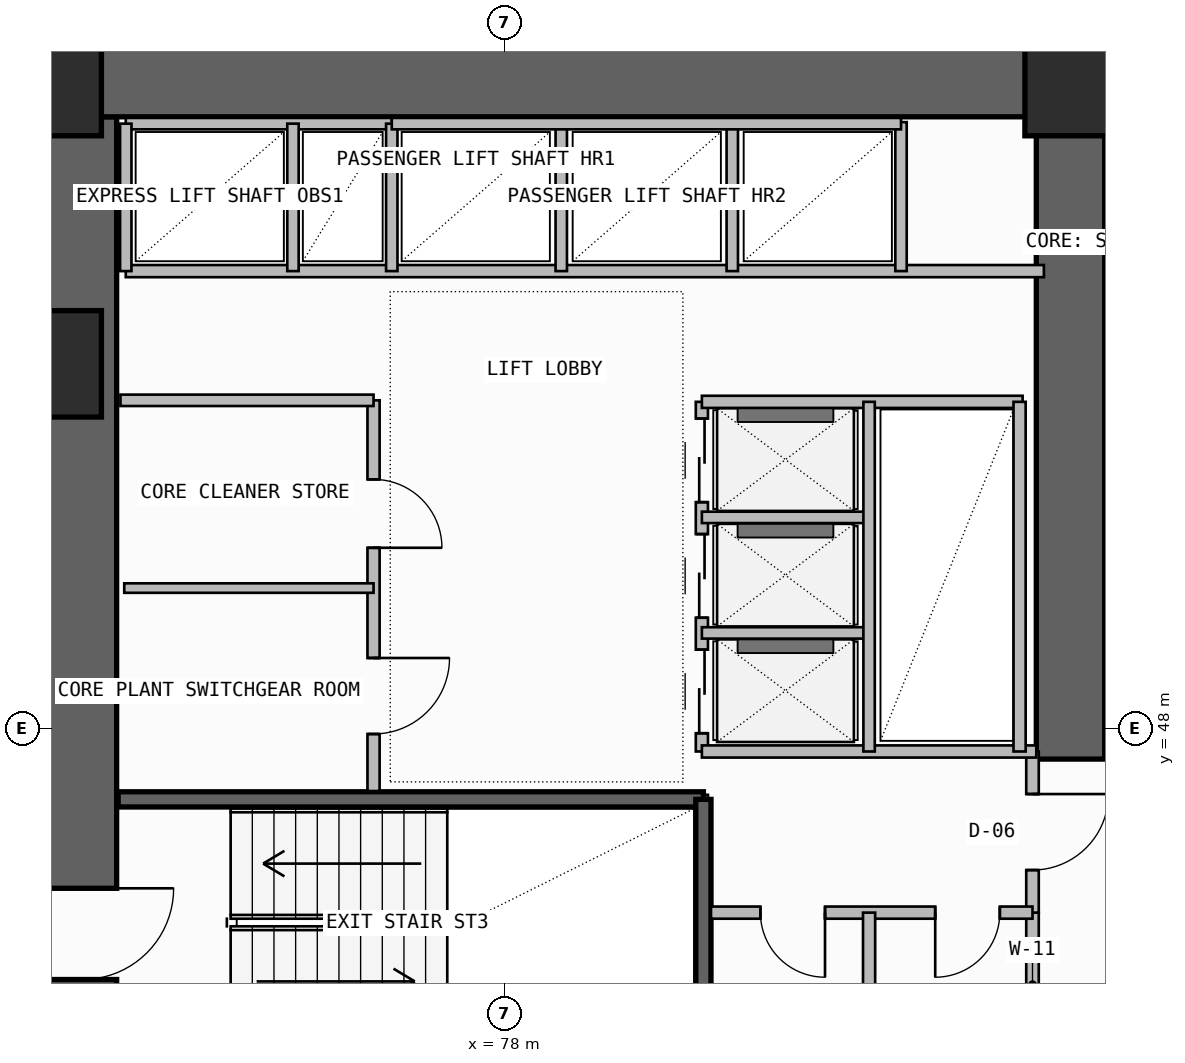
"""IFC4 building model, lengths in metres.
Left out: names, types, materials, properties, quantities, classifications, styles, units other than length and angle.
Written with IfcOpenShell. Run it as: python <this file> out.ifc"""

import sys

from ifc_helpers import new_model, si_unit, direction, frame, frame_2d, origin, origin_2d, place, context, subcontext, project, spatial, rectangle, extrude, element, fill, save


model = new_model("IFC4")
c1 = context("Model", 3, precision=1e-05, world=origin(), true_north=direction((0.0, 1.0)))
c2 = subcontext(c1, "Body", "Model", "MODEL_VIEW")
j1 = project(units=[si_unit("LENGTHUNIT", "METRE"), si_unit("PLANEANGLEUNIT", "RADIAN")], contexts=[c1])
p1 = place(None, origin())
s1 = spatial("IfcSite", under=j1, at=p1, CompositionType="ELEMENT")
p2 = place(p1, origin())
s2 = spatial("IfcBuilding", under=s1, at=p2, CompositionType="ELEMENT")
p3 = place(p2, frame((0.0, 0.0, 120.9)))
s3 = spatial("IfcBuildingStorey", under=s2, at=p3, CompositionType="ELEMENT", Elevation=120.9)
p4 = place(p3, frame((72.45, 43.35, -0.26), z_axis=(0.0, 0.0, 1.0), x_axis=(0.0, 1.0, 0.0)))
e1 = element("IfcWall", 1, at=p4, inside=s3, PredefinedType="SHEAR", context=c2, shape_type="SweptSolid", body=[
    extrude(rectangle(XDim=12.7, YDim=0.9, at=frame_2d((6.35, 0.0))), origin(), (0.0, 0.0, 1.0), 3.6),
])
p5 = place(p4, frame((1.35, 0.0, 0.26)))
e2 = element("IfcOpeningElement", 2, at=p5, cuts=e1, PredefinedType="OPENING", context=c2, shape_type="SweptSolid", body=[
    extrude(rectangle(XDim=1.2, YDim=2.2, at=frame_2d((0.6, 1.1))), frame((0.0, 0.46, 0.0), z_axis=(0.0, -1.0, 0.0), x_axis=(1.0, 0.0, 0.0)), (0.0, 0.0, 1.0), 0.92),
])
p6 = place(p3, frame((72.0, 56.5, -0.26), z_axis=(0.0, 0.0, 1.0), x_axis=(1.0, 0.0, 0.0)))
e3 = element("IfcWall", 3, at=p6, inside=s3, PredefinedType="SHEAR", context=c2, shape_type="SweptSolid", body=[
    extrude(rectangle(XDim=13.9, YDim=0.9, at=frame_2d((6.95, 0.0))), origin(), (0.0, 0.0, 1.0), 3.6),
])
p7 = place(p3, frame((85.45, 47.6, -0.26), z_axis=(0.0, 0.0, 1.0), x_axis=(0.0, 1.0, 0.0)))
e4 = element("IfcWall", 4, at=p7, inside=s3, PredefinedType="SHEAR", context=c2, shape_type="SweptSolid", body=[
    extrude(rectangle(XDim=8.45, YDim=0.9, at=frame_2d((4.225, 0.0))), origin(), (0.0, 0.0, 1.0), 3.6),
])
for number, where, z_axis, x_axis in (
    (5, (72.0, 52.8, 0.0), (0.0, 0.0, 1.0), (1.0, 0.0, 0.0)),
    (6, (72.0, 56.5, 0.0), (0.0, 0.0, 1.0), (1.0, 0.0, 0.0)),
    (7, (85.55, 56.5, 0.0), (0.0, 0.0, 1.0), (1.0, 0.0, 0.0)),
):
    element("IfcColumn", number, at=place(p3, frame(where, z_axis=z_axis, x_axis=x_axis)), inside=s3, PredefinedType="COLUMN", context=c2, shape_type="SweptSolid", body=[
        extrude(rectangle(XDim=1.4, YDim=1.4, at=origin_2d()), origin(), (0.0, 0.0, 1.0), 3.6),
    ])
p8 = place(p3, frame((72.92, 47.07, -0.26), z_axis=(0.0, 0.0, 1.0), x_axis=(1.0, 0.0, 0.0)))
e8 = element("IfcWall", 8, at=p8, inside=s3, PredefinedType="SOLIDWALL", context=c2, shape_type="SweptSolid", body=[
    extrude(rectangle(XDim=7.7, YDim=0.2, at=frame_2d((3.85, 0.0))), origin(), (0.0, 0.0, 1.0), 3.6),
])
p9 = place(p3, frame((80.62, 43.83, -0.26), z_axis=(0.0, 0.0, 1.0), x_axis=(0.0, 1.0, 0.0)))
e9 = element("IfcWall", 9, at=p9, inside=s3, PredefinedType="SOLIDWALL", context=c2, shape_type="SweptSolid", body=[
    extrude(rectangle(XDim=3.24, YDim=0.2, at=frame_2d((1.62, 0.0))), origin(), (0.0, 0.0, 1.0), 3.6),
])
p10 = place(p3, frame((84.95, 43.68, 0.0), z_axis=(0.0, 0.0, 1.0), x_axis=(0.0, 1.0, 0.0)))
e10 = element("IfcWall", 10, at=p10, inside=s3, PredefinedType="PLUMBINGWALL", context=c2, shape_type="SweptSolid", body=[
    extrude(rectangle(XDim=1.9, YDim=0.165, at=frame_2d((0.95, 0.0))), origin(), (0.0, 0.0, 1.0), 3.34),
])
p11 = place(p3, frame((84.95, 45.58, 0.0), z_axis=(0.0, 0.0, 1.0), x_axis=(0.0, 1.0, 0.0)))
e11 = element("IfcWall", 11, at=p11, inside=s3, PredefinedType="PARTITIONING", context=c2, shape_type="SweptSolid", body=[
    extrude(rectangle(XDim=2.12, YDim=0.165, at=frame_2d((1.06, 0.0))), origin(), (0.0, 0.0, 1.0), 3.34),
])
p12 = place(p11, frame((0.56, 0.0, 0.0)))
e12 = element("IfcOpeningElement", 12, at=p12, cuts=e11, PredefinedType="OPENING", context=c2, shape_type="SweptSolid", body=[
    extrude(rectangle(XDim=1.0, YDim=2.2, at=frame_2d((0.5, 1.1))), frame((0.0, 0.093, 0.0), z_axis=(0.0, -1.0, 0.0), x_axis=(1.0, 0.0, 0.0)), (0.0, 0.0, 1.0), 0.185),
])
p13 = place(p3, frame((80.72, 45.58, 0.0), z_axis=(0.0, 0.0, 1.0), x_axis=(1.0, 0.0, 0.0)))
e13 = element("IfcWall", 13, at=p13, inside=s3, PredefinedType="PLUMBINGWALL", context=c2, shape_type="SweptSolid", body=[
    extrude(rectangle(XDim=4.23, YDim=0.16, at=frame_2d((2.115, 0.0))), origin(), (0.0, 0.0, 1.0), 3.34),
])
p14 = place(p13, frame((0.65, 0.0, 0.0)))
e14 = element("IfcOpeningElement", 14, at=p14, cuts=e13, PredefinedType="OPENING", context=c2, shape_type="SweptSolid", body=[
    extrude(rectangle(XDim=0.85, YDim=2.05, at=frame_2d((0.425, 1.025))), frame((0.0, 0.09, 0.0), z_axis=(0.0, -1.0, 0.0), x_axis=(1.0, 0.0, 0.0)), (0.0, 0.0, 1.0), 0.18),
])
p15 = place(p13, frame((2.95, 0.0, 0.0)))
e15 = element("IfcOpeningElement", 15, at=p15, cuts=e13, PredefinedType="OPENING", context=c2, shape_type="SweptSolid", body=[
    extrude(rectangle(XDim=0.85, YDim=2.05, at=frame_2d((0.425, 1.025))), frame((0.0, 0.09, 0.0), z_axis=(0.0, -1.0, 0.0), x_axis=(1.0, 0.0, 0.0)), (0.0, 0.0, 1.0), 0.18),
])
p16 = place(p3, frame((82.8, 43.68, 0.0), z_axis=(0.0, 0.0, 1.0), x_axis=(0.0, 1.0, 0.0)))
e16 = element("IfcWall", 16, at=p16, inside=s3, PredefinedType="PLUMBINGWALL", context=c2, shape_type="SweptSolid", body=[
    extrude(rectangle(XDim=1.9, YDim=0.16, at=frame_2d((0.95, 0.0))), origin(), (0.0, 0.0, 1.0), 3.34),
])
p17 = place(p3, frame((76.28, 47.18, 0.0), z_axis=(0.0, 0.0, 1.0), x_axis=(0.0, 1.0, 0.0)))
e17 = element("IfcWall", 17, at=p17, inside=s3, PredefinedType="SOLIDWALL", context=c2, shape_type="SweptSolid", body=[
    extrude(rectangle(XDim=5.14, YDim=0.16, at=frame_2d((2.57, 0.0))), origin(), (0.0, 0.0, 1.0), 3.34),
])
p18 = place(p17, frame((0.75, 0.0, 0.0)))
e18 = element("IfcOpeningElement", 18, at=p18, cuts=e17, PredefinedType="OPENING", context=c2, shape_type="SweptSolid", body=[
    extrude(rectangle(XDim=1.0, YDim=2.2, at=frame_2d((0.5, 1.1))), frame((0.0, 0.09, 0.0), z_axis=(0.0, -1.0, 0.0), x_axis=(1.0, 0.0, 0.0)), (0.0, 0.0, 1.0), 0.18),
])
p19 = place(p17, frame((3.2, 0.0, 0.0)))
e19 = element("IfcOpeningElement", 19, at=p19, cuts=e17, PredefinedType="OPENING", context=c2, shape_type="SweptSolid", body=[
    extrude(rectangle(XDim=0.9, YDim=2.1, at=frame_2d((0.45, 1.05))), frame((0.0, 0.09, 0.0), z_axis=(0.0, -1.0, 0.0), x_axis=(1.0, 0.0, 0.0)), (0.0, 0.0, 1.0), 0.18),
])
p20 = place(p3, frame((72.95, 52.32, 0.0), z_axis=(0.0, 0.0, 1.0), x_axis=(1.0, 0.0, 0.0)))
e20 = element("IfcWall", 20, at=p20, inside=s3, PredefinedType="SOLIDWALL", context=c2, shape_type="SweptSolid", body=[
    extrude(rectangle(XDim=3.33, YDim=0.15, at=frame_2d((1.665, 0.0))), origin(), (0.0, 0.0, 1.0), 3.34),
])
p21 = place(p3, frame((73.0, 49.85, 0.0), z_axis=(0.0, 0.0, 1.0), x_axis=(1.0, 0.0, 0.0)))
e21 = element("IfcWall", 21, at=p21, inside=s3, PredefinedType="PARTITIONING", context=c2, shape_type="SweptSolid", body=[
    extrude(rectangle(XDim=3.28, YDim=0.125, at=frame_2d((1.64, 0.0))), origin(), (0.0, 0.0, 1.0), 3.34),
])
p22 = place(p3, frame((80.6, 47.7, 0.0), z_axis=(0.0, 0.0, 1.0), x_axis=(0.0, 1.0, 0.0)))
e22 = element("IfcWall", 22, at=p22, inside=s3, PredefinedType="SOLIDWALL", context=c2, shape_type="SweptSolid", body=[
    extrude(rectangle(XDim=4.6, YDim=0.16, at=frame_2d((2.3, 0.0))), origin(), (0.0, 0.0, 1.0), 3.34),
])
p23 = place(p22, frame((0.24, 0.0, 0.0)))
e23 = element("IfcOpeningElement", 23, at=p23, cuts=e22, PredefinedType="OPENING", context=c2, shape_type="SweptSolid", body=[
    extrude(rectangle(XDim=1.1, YDim=2.25, at=frame_2d((0.55, 1.125))), frame((0.0, 0.09, 0.0), z_axis=(0.0, -1.0, 0.0), x_axis=(1.0, 0.0, 0.0)), (0.0, 0.0, 1.0), 0.18),
])
p24 = place(p22, frame((1.76, 0.0, 0.0)))
e24 = element("IfcOpeningElement", 24, at=p24, cuts=e22, PredefinedType="OPENING", context=c2, shape_type="SweptSolid", body=[
    extrude(rectangle(XDim=1.1, YDim=2.25, at=frame_2d((0.55, 1.125))), frame((0.0, 0.09, 0.0), z_axis=(0.0, -1.0, 0.0), x_axis=(1.0, 0.0, 0.0)), (0.0, 0.0, 1.0), 0.18),
])
p25 = place(p22, frame((3.28, 0.0, 0.0)))
e25 = element("IfcOpeningElement", 25, at=p25, cuts=e22, PredefinedType="OPENING", context=c2, shape_type="SweptSolid", body=[
    extrude(rectangle(XDim=1.1, YDim=2.25, at=frame_2d((0.55, 1.125))), frame((0.0, 0.09, 0.0), z_axis=(0.0, -1.0, 0.0), x_axis=(1.0, 0.0, 0.0)), (0.0, 0.0, 1.0), 0.18),
])
p26 = place(p3, frame((80.6, 47.7, 0.0), z_axis=(0.0, 0.0, 1.0), x_axis=(1.0, 0.0, 0.0)))
e26 = element("IfcWall", 26, at=p26, inside=s3, PredefinedType="SOLIDWALL", context=c2, shape_type="SweptSolid", body=[
    extrude(rectangle(XDim=4.4, YDim=0.16, at=frame_2d((2.2, 0.0))), origin(), (0.0, 0.0, 1.0), 3.34),
])
p27 = place(p3, frame((80.6, 52.3, 0.0), z_axis=(0.0, 0.0, 1.0), x_axis=(1.0, 0.0, 0.0)))
e27 = element("IfcWall", 27, at=p27, inside=s3, PredefinedType="SOLIDWALL", context=c2, shape_type="SweptSolid", body=[
    extrude(rectangle(XDim=4.22, YDim=0.16, at=frame_2d((2.11, 0.0))), origin(), (0.0, 0.0, 1.0), 3.34),
])
for number, where, z_axis, x_axis in (
    (28, (80.6, 49.26, 0.0), (0.0, 0.0, 1.0), (1.0, 0.0, 0.0)),
    (29, (80.6, 50.78, 0.0), (0.0, 0.0, 1.0), (1.0, 0.0, 0.0)),
):
    element("IfcWall", number, at=place(p3, frame(where, z_axis=z_axis, x_axis=x_axis)), inside=s3, PredefinedType="PLUMBINGWALL", context=c2, shape_type="SweptSolid", body=[
        extrude(rectangle(XDim=2.2, YDim=0.15, at=frame_2d((1.1, 0.0))), origin(), (0.0, 0.0, 1.0), 3.34),
    ])
p28 = place(p3, frame((82.8, 47.7, 0.0), z_axis=(0.0, 0.0, 1.0), x_axis=(0.0, 1.0, 0.0)))
e30 = element("IfcWall", 30, at=p28, inside=s3, PredefinedType="PLUMBINGWALL", context=c2, shape_type="SweptSolid", body=[
    extrude(rectangle(XDim=4.6, YDim=0.15, at=frame_2d((2.3, 0.0))), origin(), (0.0, 0.0, 1.0), 3.34),
])
p29 = place(p3, frame((84.78, 47.7, 0.0), z_axis=(0.0, 0.0, 1.0), x_axis=(0.0, 1.0, 0.0)))
e31 = element("IfcWall", 31, at=p29, inside=s3, PredefinedType="SOLIDWALL", context=c2, shape_type="SweptSolid", body=[
    extrude(rectangle(XDim=4.6, YDim=0.16, at=frame_2d((2.3, 0.0))), origin(), (0.0, 0.0, 1.0), 3.34),
])
p30 = place(p3, frame((73.02, 54.02, 0.0), z_axis=(0.0, 0.0, 1.0), x_axis=(1.0, 0.0, 0.0)))
e32 = element("IfcWall", 32, at=p30, inside=s3, PredefinedType="SOLIDWALL", context=c2, shape_type="SweptSolid", body=[
    extrude(rectangle(XDim=12.08, YDim=0.16, at=frame_2d((6.04, 0.0))), origin(), (0.0, 0.0, 1.0), 3.34),
])
p31 = place(p3, frame((73.02, 55.96, 0.0), z_axis=(0.0, 0.0, 1.0), x_axis=(1.0, 0.0, 0.0)))
e33 = element("IfcWall", 33, at=p31, inside=s3, PredefinedType="SOLIDWALL", context=c2, shape_type="SweptSolid", body=[
    extrude(rectangle(XDim=3.5, YDim=0.15, at=frame_2d((1.75, 0.0))), origin(), (0.0, 0.0, 1.0), 3.34),
])
p32 = place(p3, frame((73.02, 54.02, 0.0), z_axis=(0.0, 0.0, 1.0), x_axis=(0.0, 1.0, 0.0)))
e34 = element("IfcWall", 34, at=p32, inside=s3, PredefinedType="PLUMBINGWALL", context=c2, shape_type="SweptSolid", body=[
    extrude(rectangle(XDim=1.94, YDim=0.15, at=frame_2d((0.97, 0.0))), origin(), (0.0, 0.0, 1.0), 3.34),
])
p33 = place(p3, frame((76.52, 54.02, 0.0), z_axis=(0.0, 0.0, 1.0), x_axis=(0.0, 1.0, 0.0)))
e35 = element("IfcWall", 35, at=p33, inside=s3, PredefinedType="SOLIDWALL", context=c2, shape_type="SweptSolid", body=[
    extrude(rectangle(XDim=1.94, YDim=0.15, at=frame_2d((0.97, 0.0))), origin(), (0.0, 0.0, 1.0), 3.34),
])
p34 = place(p3, frame((75.22, 54.02, 0.0), z_axis=(0.0, 0.0, 1.0), x_axis=(0.0, 1.0, 0.0)))
e36 = element("IfcWall", 36, at=p34, inside=s3, PredefinedType="PLUMBINGWALL", context=c2, shape_type="SweptSolid", body=[
    extrude(rectangle(XDim=1.94, YDim=0.15, at=frame_2d((0.97, 0.0))), origin(), (0.0, 0.0, 1.0), 3.34),
])
for number, where, z_axis, x_axis in (
    (37, (78.75, 54.02, 0.0), (0.0, 0.0, 1.0), (0.0, 1.0, 0.0)),
    (38, (81.0, 54.02, 0.0), (0.0, 0.0, 1.0), (0.0, 1.0, 0.0)),
):
    element("IfcWall", number, at=place(p3, frame(where, z_axis=z_axis, x_axis=x_axis)), inside=s3, PredefinedType="PLUMBINGWALL", context=c2, shape_type="SweptSolid", body=[
        extrude(rectangle(XDim=1.96, YDim=0.15, at=frame_2d((0.98, 0.0))), origin(), (0.0, 0.0, 1.0), 3.34),
    ])
p35 = place(p3, frame((83.22, 54.02, 0.0), z_axis=(0.0, 0.0, 1.0), x_axis=(0.0, 1.0, 0.0)))
e39 = element("IfcWall", 39, at=p35, inside=s3, PredefinedType="SOLIDWALL", context=c2, shape_type="SweptSolid", body=[
    extrude(rectangle(XDim=1.96, YDim=0.15, at=frame_2d((0.98, 0.0))), origin(), (0.0, 0.0, 1.0), 3.34),
])
p36 = place(p3, frame((76.52, 55.96, 0.0), z_axis=(0.0, 0.0, 1.0), x_axis=(1.0, 0.0, 0.0)))
e40 = element("IfcWall", 40, at=p36, inside=s3, PredefinedType="SOLIDWALL", context=c2, shape_type="SweptSolid", body=[
    extrude(rectangle(XDim=6.7, YDim=0.15, at=frame_2d((3.35, 0.0))), origin(), (0.0, 0.0, 1.0), 3.34),
])
p37 = place(p5, frame((1.2, 0.0, 0.0), z_axis=(0.0, 0.0, 1.0), x_axis=(-1.0, 0.0, 0.0)))
e41 = element("IfcDoor", 41, at=p37, inside=s3, OperationType="SINGLE_SWING_LEFT", PredefinedType="USERDEFINED", context=c2, shape_type="SweptSolid", body=[
    extrude(rectangle(XDim=1.2, YDim=2.2, at=frame_2d((0.6, 1.1))), frame((0.0, 0.025, 0.0), z_axis=(0.0, -1.0, 0.0), x_axis=(1.0, 0.0, 0.0)), (0.0, 0.0, 1.0), 0.05),
])
fill(e2, e41)
p38 = place(p12, frame((1.0, 0.0, 0.0), z_axis=(0.0, 0.0, 1.0), x_axis=(-1.0, 0.0, 0.0)))
e42 = element("IfcDoor", 42, at=p38, inside=s3, OperationType="SINGLE_SWING_LEFT", PredefinedType="DOOR", context=c2, shape_type="SweptSolid", body=[
    extrude(rectangle(XDim=1.0, YDim=2.2, at=frame_2d((0.5, 1.1))), frame((0.0, 0.025, 0.0), z_axis=(0.0, -1.0, 0.0), x_axis=(1.0, 0.0, 0.0)), (0.0, 0.0, 1.0), 0.05),
])
fill(e12, e42)
p39 = place(p14, frame((0.85, 0.0, 0.0), z_axis=(0.0, 0.0, 1.0), x_axis=(-1.0, 0.0, 0.0)))
e43 = element("IfcDoor", 43, at=p39, inside=s3, OperationType="SINGLE_SWING_LEFT", PredefinedType="DOOR", context=c2, shape_type="SweptSolid", body=[
    extrude(rectangle(XDim=0.85, YDim=2.05, at=frame_2d((0.425, 1.025))), frame((0.0, 0.025, 0.0), z_axis=(0.0, -1.0, 0.0), x_axis=(1.0, 0.0, 0.0)), (0.0, 0.0, 1.0), 0.05),
])
fill(e14, e43)
p40 = place(p15, frame((0.85, 0.0, 0.0), z_axis=(0.0, 0.0, 1.0), x_axis=(-1.0, 0.0, 0.0)))
e44 = element("IfcDoor", 44, at=p40, inside=s3, OperationType="SINGLE_SWING_RIGHT", PredefinedType="DOOR", context=c2, shape_type="SweptSolid", body=[
    extrude(rectangle(XDim=0.85, YDim=2.05, at=frame_2d((0.425, 1.025))), frame((0.0, 0.025, 0.0), z_axis=(0.0, -1.0, 0.0), x_axis=(1.0, 0.0, 0.0)), (0.0, 0.0, 1.0), 0.05),
])
fill(e15, e44)
p41 = place(p18, frame((1.0, 0.0, 0.0), z_axis=(0.0, 0.0, 1.0), x_axis=(-1.0, 0.0, 0.0)))
e45 = element("IfcDoor", 45, at=p41, inside=s3, OperationType="SINGLE_SWING_LEFT", PredefinedType="DOOR", context=c2, shape_type="SweptSolid", body=[
    extrude(rectangle(XDim=1.0, YDim=2.2, at=frame_2d((0.5, 1.1))), frame((0.0, 0.025, 0.0), z_axis=(0.0, -1.0, 0.0), x_axis=(1.0, 0.0, 0.0)), (0.0, 0.0, 1.0), 0.05),
])
fill(e18, e45)
p42 = place(p19, frame((0.9, 0.0, 0.0), z_axis=(0.0, 0.0, 1.0), x_axis=(-1.0, 0.0, 0.0)))
e46 = element("IfcDoor", 46, at=p42, inside=s3, OperationType="SINGLE_SWING_RIGHT", PredefinedType="DOOR", context=c2, shape_type="SweptSolid", body=[
    extrude(rectangle(XDim=0.9, YDim=2.1, at=frame_2d((0.45, 1.05))), frame((0.0, 0.025, 0.0), z_axis=(0.0, -1.0, 0.0), x_axis=(1.0, 0.0, 0.0)), (0.0, 0.0, 1.0), 0.05),
])
fill(e19, e46)
p43 = place(p23, frame((1.1, 0.0, 0.0), z_axis=(0.0, 0.0, 1.0), x_axis=(-1.0, 0.0, 0.0)))
e47 = element("IfcDoor", 47, at=p43, inside=s3, OperationType="DOUBLE_DOOR_SLIDING", PredefinedType="DOOR", context=c2, shape_type="SweptSolid", body=[
    extrude(rectangle(XDim=1.1, YDim=2.25, at=frame_2d((0.55, 1.125))), frame((0.0, 0.025, 0.0), z_axis=(0.0, -1.0, 0.0), x_axis=(1.0, 0.0, 0.0)), (0.0, 0.0, 1.0), 0.05),
])
fill(e23, e47)
p44 = place(p24, frame((1.1, 0.0, 0.0), z_axis=(0.0, 0.0, 1.0), x_axis=(-1.0, 0.0, 0.0)))
e48 = element("IfcDoor", 48, at=p44, inside=s3, OperationType="DOUBLE_DOOR_SLIDING", PredefinedType="DOOR", context=c2, shape_type="SweptSolid", body=[
    extrude(rectangle(XDim=1.1, YDim=2.25, at=frame_2d((0.55, 1.125))), frame((0.0, 0.025, 0.0), z_axis=(0.0, -1.0, 0.0), x_axis=(1.0, 0.0, 0.0)), (0.0, 0.0, 1.0), 0.05),
])
fill(e24, e48)
p45 = place(p25, frame((1.1, 0.0, 0.0), z_axis=(0.0, 0.0, 1.0), x_axis=(-1.0, 0.0, 0.0)))
e49 = element("IfcDoor", 49, at=p45, inside=s3, OperationType="DOUBLE_DOOR_SLIDING", PredefinedType="DOOR", context=c2, shape_type="SweptSolid", body=[
    extrude(rectangle(XDim=1.1, YDim=2.25, at=frame_2d((0.55, 1.125))), frame((0.0, 0.025, 0.0), z_axis=(0.0, -1.0, 0.0), x_axis=(1.0, 0.0, 0.0)), (0.0, 0.0, 1.0), 0.05),
])
fill(e25, e49)
save(model, sys.argv[1])
